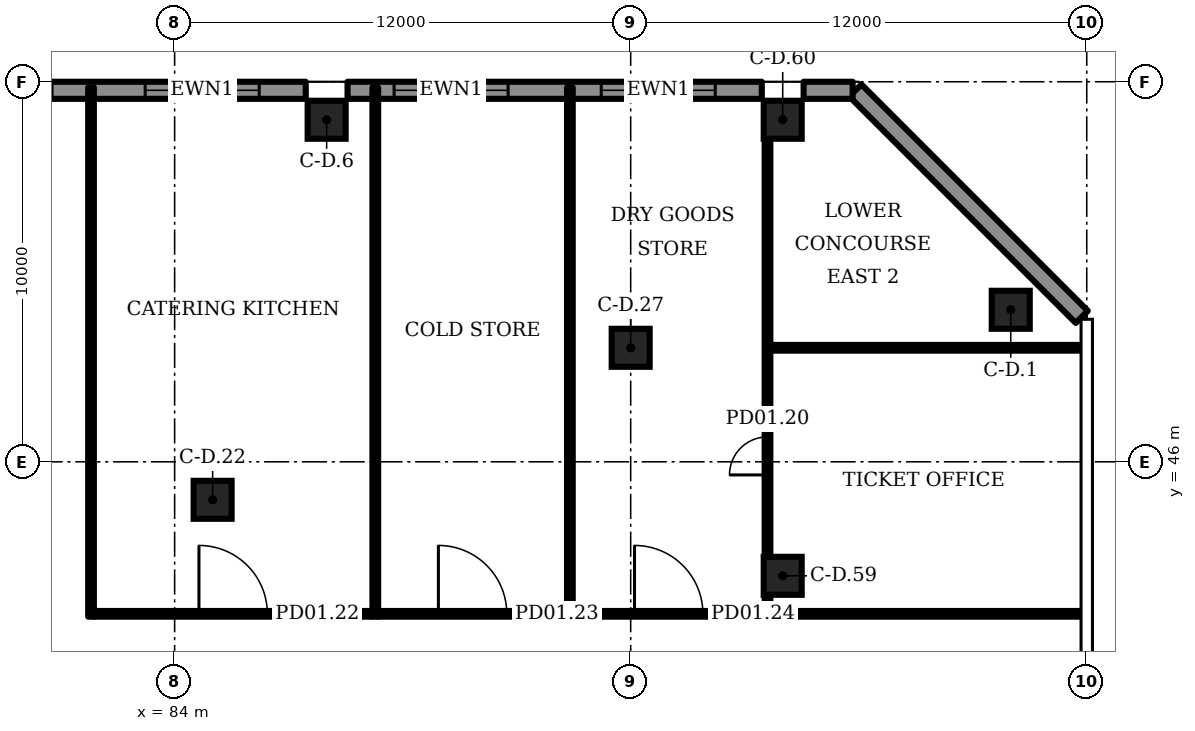
"""IFC4 building model, lengths in metres.
Left out: names, types, materials, properties, quantities, classifications, styles, units other than length and angle.
Written with IfcOpenShell. Run it as: python <this file> out.ifc"""

import sys

from ifc_helpers import new_model, si_unit, direction, frame, frame_2d, origin, origin_2d, place, context, subcontext, project, spatial, rectangle, extrude, element, fill, save


model = new_model("IFC4")
c1 = context("Model", 3, precision=1e-05, world=origin(), true_north=direction((0.0, 1.0)))
c2 = subcontext(c1, "Body", "Model", "MODEL_VIEW")
j1 = project(units=[si_unit("LENGTHUNIT", "METRE"), si_unit("PLANEANGLEUNIT", "RADIAN")], contexts=[c1])
p1 = place(None, origin())
s1 = spatial("IfcSite", under=j1, at=p1, CompositionType="ELEMENT")
p2 = place(p1, origin())
s2 = spatial("IfcBuilding", under=s1, at=p2, CompositionType="ELEMENT")
p3 = place(p2, frame((0.0, 0.0, 8.0)))
s3 = spatial("IfcBuildingStorey", under=s2, at=p3, CompositionType="ELEMENT", Elevation=8.0)
for number, where, z_axis, x_axis in (
    (1, (106.0, 50.0, 0.0), (0.0, 0.0, 1.0), (1.0, 0.0, 0.0)),
    (2, (88.0, 55.0, 0.0), (0.0, 0.0, 1.0), (1.0, 0.0, 0.0)),
    (3, (85.0, 45.0, 0.0), (0.0, 0.0, 1.0), (1.0, 0.0, 0.0)),
    (4, (96.0, 49.0, 0.0), (0.0, 0.0, 1.0), (1.0, 0.0, 0.0)),
    (5, (100.0, 43.0, 0.0), (0.0, 0.0, 1.0), (1.0, 0.0, 0.0)),
    (6, (100.0, 55.0, 0.0), (0.0, 0.0, 1.0), (1.0, 0.0, 0.0)),
):
    element("IfcColumn", number, at=place(p3, frame(where, z_axis=z_axis, x_axis=x_axis)), inside=s3, PredefinedType="COLUMN", context=c2, shape_type="SweptSolid", body=[
        extrude(rectangle(XDim=1.0, YDim=1.0, at=origin_2d()), origin(), (0.0, 0.0, 1.0), 7.0),
    ])
p4 = place(p3, frame((107.869, 49.812, 0.0), z_axis=(0.0, 0.0, 1.0), x_axis=(-0.707092, 0.707121, 0.0)))
e7 = element("IfcWall", 7, at=p4, inside=s3, PredefinedType="SOLIDWALL", context=c2, shape_type="SweptSolid", body=[
    extrude(rectangle(XDim=8.425, YDim=0.45, at=frame_2d((4.213, 0.0))), origin(), (0.0, 0.0, 1.0), 6.7),
])
p5 = place(p3, frame((99.45, 55.775, 0.0), z_axis=(0.0, 0.0, 1.0), x_axis=(-1.0, 0.0, 0.0)))
e8 = element("IfcWall", 8, at=p5, inside=s3, PredefinedType="SOLIDWALL", context=c2, shape_type="SweptSolid", body=[
    extrude(rectangle(XDim=10.9, YDim=0.45, at=frame_2d((5.45, 0.0))), origin(), (0.0, 0.0, 1.0), 6.7),
])
p6 = place(p5, frame((1.225, 0.0, 1.0)))
e9 = element("IfcOpeningElement", 9, at=p6, cuts=e8, PredefinedType="OPENING", context=c2, shape_type="SweptSolid", body=[
    extrude(rectangle(XDim=3.0, YDim=4.7, at=frame_2d((1.5, 2.35))), frame((0.0, 0.235, 0.0), z_axis=(0.0, -1.0, 0.0), x_axis=(1.0, 0.0, 0.0)), (0.0, 0.0, 1.0), 0.47),
])
p7 = place(p5, frame((6.675, 0.0, 1.0)))
e10 = element("IfcOpeningElement", 10, at=p7, cuts=e8, PredefinedType="OPENING", context=c2, shape_type="SweptSolid", body=[
    extrude(rectangle(XDim=3.0, YDim=4.7, at=frame_2d((1.5, 2.35))), frame((0.0, 0.235, 0.0), z_axis=(0.0, -1.0, 0.0), x_axis=(1.0, 0.0, 0.0)), (0.0, 0.0, 1.0), 0.47),
])
p8 = place(p3, frame((87.45, 55.775, 0.0), z_axis=(0.0, 0.0, 1.0), x_axis=(-1.0, 0.0, 0.0)))
e11 = element("IfcWall", 11, at=p8, inside=s3, PredefinedType="SOLIDWALL", context=c2, shape_type="SweptSolid", body=[
    extrude(rectangle(XDim=10.9, YDim=0.45, at=frame_2d((5.45, 0.0))), origin(), (0.0, 0.0, 1.0), 6.7),
])
p9 = place(p8, frame((1.225, 0.0, 1.0)))
e12 = element("IfcOpeningElement", 12, at=p9, cuts=e11, PredefinedType="OPENING", context=c2, shape_type="SweptSolid", body=[
    extrude(rectangle(XDim=3.0, YDim=4.7, at=frame_2d((1.5, 2.35))), frame((0.0, 0.235, 0.0), z_axis=(0.0, -1.0, 0.0), x_axis=(1.0, 0.0, 0.0)), (0.0, 0.0, 1.0), 0.47),
])
p10 = place(p8, frame((6.675, 0.0, 1.0)))
e13 = element("IfcOpeningElement", 13, at=p10, cuts=e11, PredefinedType="OPENING", context=c2, shape_type="SweptSolid", body=[
    extrude(rectangle(XDim=3.0, YDim=4.7, at=frame_2d((1.5, 2.35))), frame((0.0, 0.235, 0.0), z_axis=(0.0, -1.0, 0.0), x_axis=(1.0, 0.0, 0.0)), (0.0, 0.0, 1.0), 0.47),
])
p11 = place(p3, frame((101.84, 55.775, 0.0), z_axis=(0.0, 0.0, 1.0), x_axis=(-1.0, 0.0, 0.0)))
e14 = element("IfcWall", 14, at=p11, inside=s3, PredefinedType="SOLIDWALL", context=c2, shape_type="SweptSolid", body=[
    extrude(rectangle(XDim=1.29, YDim=0.45, at=frame_2d((0.645, 0.0))), origin(), (0.0, 0.0, 1.0), 6.7),
])
p12 = place(p3, frame((81.875, 42.0, 0.0), z_axis=(0.0, 0.0, 1.0), x_axis=(1.0, 0.0, 0.0)))
e15 = element("IfcWall", 15, at=p12, inside=s3, PredefinedType="PARTITIONING", context=c2, shape_type="SweptSolid", body=[
    extrude(rectangle(XDim=7.33, YDim=0.15, at=frame_2d((3.665, 0.0))), origin(), (0.0, 0.0, 1.0), 6.7),
])
p13 = place(p12, frame((2.765, 0.0, 0.0)))
e16 = element("IfcOpeningElement", 16, at=p13, cuts=e15, PredefinedType="OPENING", context=c2, shape_type="SweptSolid", body=[
    extrude(rectangle(XDim=1.8, YDim=2.1, at=frame_2d((0.9, 1.05))), frame((0.0, 0.085, 0.0), z_axis=(0.0, -1.0, 0.0), x_axis=(1.0, 0.0, 0.0)), (0.0, 0.0, 1.0), 0.17),
])
p14 = place(p3, frame((89.355, 42.0, 0.0), z_axis=(0.0, 0.0, 1.0), x_axis=(1.0, 0.0, 0.0)))
e17 = element("IfcWall", 17, at=p14, inside=s3, PredefinedType="PARTITIONING", context=c2, shape_type="SweptSolid", body=[
    extrude(rectangle(XDim=4.97, YDim=0.15, at=frame_2d((2.485, 0.0))), origin(), (0.0, 0.0, 1.0), 6.7),
])
p15 = place(p14, frame((1.585, 0.0, 0.0)))
e18 = element("IfcOpeningElement", 18, at=p15, cuts=e17, PredefinedType="OPENING", context=c2, shape_type="SweptSolid", body=[
    extrude(rectangle(XDim=1.8, YDim=2.1, at=frame_2d((0.9, 1.05))), frame((0.0, 0.085, 0.0), z_axis=(0.0, -1.0, 0.0), x_axis=(1.0, 0.0, 0.0)), (0.0, 0.0, 1.0), 0.17),
])
p16 = place(p3, frame((94.475, 42.0, 0.0), z_axis=(0.0, 0.0, 1.0), x_axis=(1.0, 0.0, 0.0)))
e19 = element("IfcWall", 19, at=p16, inside=s3, PredefinedType="PARTITIONING", context=c2, shape_type="SweptSolid", body=[
    extrude(rectangle(XDim=5.05, YDim=0.15, at=frame_2d((2.525, 0.0))), origin(), (0.0, 0.0, 1.0), 6.7),
])
p17 = place(p16, frame((1.625, 0.0, 0.0)))
e20 = element("IfcOpeningElement", 20, at=p17, cuts=e19, PredefinedType="OPENING", context=c2, shape_type="SweptSolid", body=[
    extrude(rectangle(XDim=1.8, YDim=2.1, at=frame_2d((0.9, 1.05))), frame((0.0, 0.085, 0.0), z_axis=(0.0, -1.0, 0.0), x_axis=(1.0, 0.0, 0.0)), (0.0, 0.0, 1.0), 0.17),
])
for number, where, z_axis, x_axis in (
    (21, (99.675, 42.0, 0.0), (0.0, 0.0, 1.0), (1.0, 0.0, 0.0)),
    (22, (99.675, 49.0, 0.0), (0.0, 0.0, 1.0), (1.0, 0.0, 0.0)),
):
    element("IfcWall", number, at=place(p3, frame(where, z_axis=z_axis, x_axis=x_axis)), inside=s3, PredefinedType="PARTITIONING", context=c2, shape_type="SweptSolid", body=[
        extrude(rectangle(XDim=8.22, YDim=0.15, at=frame_2d((4.11, 0.0))), origin(), (0.0, 0.0, 1.0), 6.7),
    ])
p18 = place(p3, frame((99.6, 41.925, 0.0), z_axis=(0.0, 0.0, 1.0), x_axis=(0.0, 1.0, 0.0)))
e23 = element("IfcWall", 23, at=p18, inside=s3, PredefinedType="PARTITIONING", context=c2, shape_type="SweptSolid", body=[
    extrude(rectangle(XDim=0.565, YDim=0.15, at=frame_2d((0.282, 0.0))), origin(), (0.0, 0.0, 1.0), 6.7),
])
p19 = place(p3, frame((99.6, 43.51, 0.0), z_axis=(0.0, 0.0, 1.0), x_axis=(0.0, 1.0, 0.0)))
e24 = element("IfcWall", 24, at=p19, inside=s3, PredefinedType="PARTITIONING", context=c2, shape_type="SweptSolid", body=[
    extrude(rectangle(XDim=10.98, YDim=0.15, at=frame_2d((5.49, 0.0))), origin(), (0.0, 0.0, 1.0), 6.7),
])
p20 = place(p19, frame((2.145, 0.0, 0.0)))
e25 = element("IfcOpeningElement", 25, at=p20, cuts=e24, PredefinedType="OPENING", context=c2, shape_type="SweptSolid", body=[
    extrude(rectangle(XDim=1.0, YDim=2.1, at=frame_2d((0.5, 1.05))), frame((0.0, 0.085, 0.0), z_axis=(0.0, -1.0, 0.0), x_axis=(1.0, 0.0, 0.0)), (0.0, 0.0, 1.0), 0.17),
])
for number, where, z_axis, x_axis in (
    (26, (89.28, 41.925, 0.0), (0.0, 0.0, 1.0), (0.0, 1.0, 0.0)),
    (27, (81.8, 41.925, 0.0), (0.0, 0.0, 1.0), (0.0, 1.0, 0.0)),
    (28, (94.4, 41.925, 0.0), (0.0, 0.0, 1.0), (0.0, 1.0, 0.0)),
):
    element("IfcWall", number, at=place(p3, frame(where, z_axis=z_axis, x_axis=x_axis)), inside=s3, PredefinedType="PARTITIONING", context=c2, shape_type="SweptSolid", body=[
        extrude(rectangle(XDim=13.925, YDim=0.15, at=frame_2d((6.962, 0.0))), origin(), (0.0, 0.0, 1.0), 6.7),
    ])
p21 = place(p6, origin())
e29 = element("IfcWindow", 29, at=p21, inside=s3, PartitioningType="SINGLE_PANEL", PredefinedType="WINDOW", context=c2, shape_type="SweptSolid", body=[
    extrude(rectangle(XDim=3.0, YDim=4.7, at=frame_2d((1.5, 2.35))), frame((0.0, 0.105, 0.0), z_axis=(0.0, -1.0, 0.0), x_axis=(1.0, 0.0, 0.0)), (0.0, 0.0, 1.0), 0.06),
])
fill(e9, e29)
p22 = place(p7, origin())
e30 = element("IfcWindow", 30, at=p22, inside=s3, PartitioningType="SINGLE_PANEL", PredefinedType="WINDOW", context=c2, shape_type="SweptSolid", body=[
    extrude(rectangle(XDim=3.0, YDim=4.7, at=frame_2d((1.5, 2.35))), frame((0.0, 0.105, 0.0), z_axis=(0.0, -1.0, 0.0), x_axis=(1.0, 0.0, 0.0)), (0.0, 0.0, 1.0), 0.06),
])
fill(e10, e30)
p23 = place(p9, origin())
e31 = element("IfcWindow", 31, at=p23, inside=s3, PartitioningType="SINGLE_PANEL", PredefinedType="WINDOW", context=c2, shape_type="SweptSolid", body=[
    extrude(rectangle(XDim=3.0, YDim=4.7, at=frame_2d((1.5, 2.35))), frame((0.0, 0.105, 0.0), z_axis=(0.0, -1.0, 0.0), x_axis=(1.0, 0.0, 0.0)), (0.0, 0.0, 1.0), 0.06),
])
fill(e12, e31)
p24 = place(p20, origin())
e32 = element("IfcDoor", 32, at=p24, inside=s3, OperationType="SINGLE_SWING_LEFT", PredefinedType="DOOR", context=c2, shape_type="SweptSolid", body=[
    extrude(rectangle(XDim=1.0, YDim=2.1, at=frame_2d((0.5, 1.05))), frame((0.0, 0.025, 0.0), z_axis=(0.0, -1.0, 0.0), x_axis=(1.0, 0.0, 0.0)), (0.0, 0.0, 1.0), 0.05),
])
fill(e25, e32)
p25 = place(p13, origin())
e33 = element("IfcDoor", 33, at=p25, inside=s3, OperationType="DOUBLE_DOOR_SINGLE_SWING", PredefinedType="DOOR", context=c2, shape_type="SweptSolid", body=[
    extrude(rectangle(XDim=1.8, YDim=2.1, at=frame_2d((0.9, 1.05))), frame((0.0, 0.025, 0.0), z_axis=(0.0, -1.0, 0.0), x_axis=(1.0, 0.0, 0.0)), (0.0, 0.0, 1.0), 0.05),
])
fill(e16, e33)
p26 = place(p15, origin())
e34 = element("IfcDoor", 34, at=p26, inside=s3, OperationType="DOUBLE_DOOR_SINGLE_SWING", PredefinedType="DOOR", context=c2, shape_type="SweptSolid", body=[
    extrude(rectangle(XDim=1.8, YDim=2.1, at=frame_2d((0.9, 1.05))), frame((0.0, 0.025, 0.0), z_axis=(0.0, -1.0, 0.0), x_axis=(1.0, 0.0, 0.0)), (0.0, 0.0, 1.0), 0.05),
])
fill(e18, e34)
p27 = place(p17, origin())
e35 = element("IfcDoor", 35, at=p27, inside=s3, OperationType="DOUBLE_DOOR_SINGLE_SWING", PredefinedType="DOOR", context=c2, shape_type="SweptSolid", body=[
    extrude(rectangle(XDim=1.8, YDim=2.1, at=frame_2d((0.9, 1.05))), frame((0.0, 0.025, 0.0), z_axis=(0.0, -1.0, 0.0), x_axis=(1.0, 0.0, 0.0)), (0.0, 0.0, 1.0), 0.05),
])
fill(e20, e35)
save(model, sys.argv[1])
